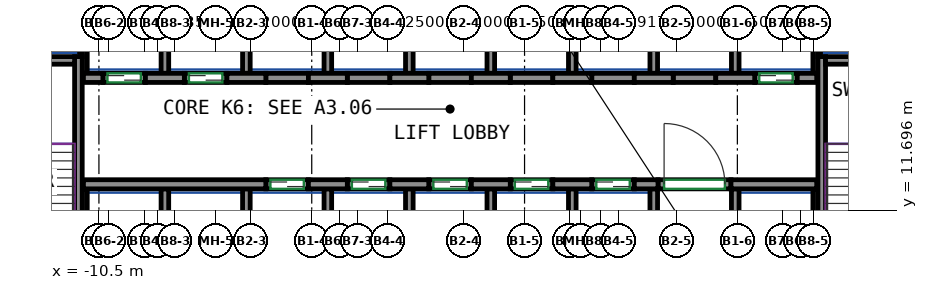
"""IFC4 building model, lengths in metres.
Left out: names, types, materials, properties, quantities, classifications, styles, units other than length and angle.
Written with IfcOpenShell. Run it as: python <this file> out.ifc"""

import sys

from ifc_helpers import new_model, si_unit, direction, frame, frame_2d, origin, place, context, subcontext, project, spatial, rectangle, extrude, source, transform, mapped, element, fill, save


model = new_model("IFC4")
c1 = context("Model", 3, precision=1e-05, world=origin(), true_north=direction((0.0, 1.0)))
c2 = subcontext(c1, "Body", "Model", "MODEL_VIEW")
j1 = project(units=[si_unit("LENGTHUNIT", "METRE"), si_unit("PLANEANGLEUNIT", "RADIAN")], contexts=[c1])
p1 = place(None, origin())
s1 = spatial("IfcSite", under=j1, at=p1, CompositionType="ELEMENT")
p2 = place(p1, origin())
s2 = spatial("IfcBuilding", under=s1, at=p2, CompositionType="ELEMENT")
p3 = place(p2, frame((0.0, 0.0, 27.0)))
s3 = spatial("IfcBuildingStorey", under=s2, at=p3, CompositionType="ELEMENT", Elevation=27.0)
m1 = source(origin(), c2, "Body", "SweptSolid", [
    extrude(rectangle(XDim=7.75, YDim=0.25, at=frame_2d((3.875, 0.0))), origin(), (0.0, 0.0, 1.0), 3.72),
])
p4 = place(p3, frame((-11.175, 9.0, 0.0), z_axis=(0.0, 0.0, 1.0), x_axis=(0.0, 1.0, 0.0)))
e1 = element("IfcWall", 1, at=p4, inside=s3, PredefinedType="SHEAR", context=c2, shape_type="MappedRepresentation", body=[
    mapped(m1, transform((0.0, 0.0, 0.0))),
])
m2 = source(origin(), c2, "Body", "SweptSolid", [
    extrude(rectangle(XDim=3.7, YDim=0.25, at=frame_2d((1.85, 0.0))), origin(), (0.0, 0.0, 1.0), 3.72),
])
p5 = place(p3, frame((-15.0, 16.625, 0.0), z_axis=(0.0, 0.0, 1.0), x_axis=(1.0, 0.0, 0.0)))
e2 = element("IfcWall", 2, at=p5, inside=s3, PredefinedType="SHEAR", context=c2, shape_type="MappedRepresentation", body=[
    mapped(m2, transform((0.0, 0.0, 0.0))),
])
p6 = place(p3, frame((13.275, 9.0, 0.0), z_axis=(0.0, 0.0, 1.0), x_axis=(0.0, 1.0, 0.0)))
e3 = element("IfcWall", 3, at=p6, inside=s3, PredefinedType="SHEAR", context=c2, shape_type="MappedRepresentation", body=[
    mapped(m1, transform((0.0, 0.0, 0.0))),
])
m3 = source(origin(), c2, "Body", "SweptSolid", [
    extrude(rectangle(XDim=3.7, YDim=0.25, at=frame_2d((1.85, 0.0))), origin(), (0.0, 0.0, 1.0), 3.72),
])
p7 = place(p3, frame((13.4, 16.625, 0.0), z_axis=(0.0, 0.0, 1.0), x_axis=(1.0, 0.0, 0.0)))
e4 = element("IfcWall", 4, at=p7, inside=s3, PredefinedType="SHEAR", context=c2, shape_type="MappedRepresentation", body=[
    mapped(m3, transform((0.0, 0.0, 0.0))),
])
m4 = source(origin(), c2, "Body", "SweptSolid", [
    extrude(rectangle(XDim=6.0, YDim=0.3, at=frame_2d((3.0, 0.0))), origin(), (0.0, 0.0, 1.0), 3.72),
])
p8 = place(p3, frame((-11.01, 12.55, 0.0), z_axis=(0.0, 0.0, 1.0), x_axis=(1.0, 0.0, 0.0)))
e5 = element("IfcWall", 5, at=p8, inside=s3, PredefinedType="SHEAR", context=c2, shape_type="MappedRepresentation", body=[
    mapped(m4, transform((0.0, 0.0, 0.0))),
])
m5 = source(origin(), c2, "Body", "SweptSolid", [
    extrude(rectangle(XDim=1.28, YDim=0.3, at=frame_2d((0.64, 0.0))), origin(), (0.0, 0.0, 1.0), 3.72),
])
for number, where, z_axis, x_axis in (
    (6, (-3.61, 12.55, 0.0), (0.0, 0.0, 1.0), (1.0, 0.0, 0.0)),
    (7, (-0.93, 12.55, 0.0), (0.0, 0.0, 1.0), (1.0, 0.0, 0.0)),
    (8, (1.75, 12.55, 0.0), (0.0, 0.0, 1.0), (1.0, 0.0, 0.0)),
    (9, (4.43, 12.55, 0.0), (0.0, 0.0, 1.0), (1.0, 0.0, 0.0)),
):
    element("IfcWall", number, at=place(p3, frame(where, z_axis=z_axis, x_axis=x_axis)), inside=s3, PredefinedType="SHEAR", context=c2, shape_type="MappedRepresentation", body=[
        mapped(m5, transform((0.0, 0.0, 0.0))),
    ])
m6 = source(origin(), c2, "Body", "SweptSolid", [
    extrude(rectangle(XDim=0.78, YDim=0.3, at=frame_2d((0.39, 0.0))), origin(), (0.0, 0.0, 1.0), 3.72),
])
p9 = place(p3, frame((7.11, 12.55, 0.0), z_axis=(0.0, 0.0, 1.0), x_axis=(1.0, 0.0, 0.0)))
e10 = element("IfcWall", 10, at=p9, inside=s3, PredefinedType="SHEAR", context=c2, shape_type="MappedRepresentation", body=[
    mapped(m6, transform((0.0, 0.0, 0.0))),
])
m7 = source(origin(), c2, "Body", "SweptSolid", [
    extrude(rectangle(XDim=2.82, YDim=0.3, at=frame_2d((1.41, 0.0))), origin(), (0.0, 0.0, 1.0), 3.72),
])
p10 = place(p3, frame((10.29, 12.55, 0.0), z_axis=(0.0, 0.0, 1.0), x_axis=(1.0, 0.0, 0.0)))
e11 = element("IfcWall", 11, at=p10, inside=s3, PredefinedType="SHEAR", context=c2, shape_type="MappedRepresentation", body=[
    mapped(m7, transform((0.0, 0.0, 0.0))),
])
m8 = source(origin(), c2, "Body", "SweptSolid", [
    extrude(rectangle(XDim=0.64, YDim=0.3, at=frame_2d((0.32, 0.0))), origin(), (0.0, 0.0, 1.0), 3.72),
])
p11 = place(p3, frame((-11.01, 16.05, 0.0), z_axis=(0.0, 0.0, 1.0), x_axis=(1.0, 0.0, 0.0)))
e12 = element("IfcWall", 12, at=p11, inside=s3, PredefinedType="SHEAR", context=c2, shape_type="MappedRepresentation", body=[
    mapped(m8, transform((0.0, 0.0, 0.0))),
])
for number, where, z_axis, x_axis in (
    (13, (-8.97, 16.05, 0.0), (0.0, 0.0, 1.0), (1.0, 0.0, 0.0)),
    (14, (-6.29, 16.05, 0.0), (0.0, 0.0, 1.0), (1.0, 0.0, 0.0)),
    (15, (-3.61, 16.05, 0.0), (0.0, 0.0, 1.0), (1.0, 0.0, 0.0)),
    (16, (-0.93, 16.05, 0.0), (0.0, 0.0, 1.0), (1.0, 0.0, 0.0)),
    (17, (1.75, 16.05, 0.0), (0.0, 0.0, 1.0), (1.0, 0.0, 0.0)),
    (18, (4.43, 16.05, 0.0), (0.0, 0.0, 1.0), (1.0, 0.0, 0.0)),
):
    element("IfcWall", number, at=place(p3, frame(where, z_axis=z_axis, x_axis=x_axis)), inside=s3, PredefinedType="SHEAR", context=c2, shape_type="MappedRepresentation", body=[
        mapped(m5, transform((0.0, 0.0, 0.0))),
    ])
m9 = source(origin(), c2, "Body", "SweptSolid", [
    extrude(rectangle(XDim=1.28, YDim=0.3, at=frame_2d((0.64, 0.0))), origin(), (0.0, 0.0, 1.0), 3.72),
])
p12 = place(p3, frame((7.11, 16.05, 0.0), z_axis=(0.0, 0.0, 1.0), x_axis=(1.0, 0.0, 0.0)))
e19 = element("IfcWall", 19, at=p12, inside=s3, PredefinedType="SHEAR", context=c2, shape_type="MappedRepresentation", body=[
    mapped(m9, transform((0.0, 0.0, 0.0))),
])
p13 = place(p3, frame((9.79, 16.05, 0.0), z_axis=(0.0, 0.0, 1.0), x_axis=(1.0, 0.0, 0.0)))
e20 = element("IfcWall", 20, at=p13, inside=s3, PredefinedType="SHEAR", context=c2, shape_type="MappedRepresentation", body=[
    mapped(m5, transform((0.0, 0.0, 0.0))),
])
m10 = source(origin(), c2, "Body", "SweptSolid", [
    extrude(rectangle(XDim=0.64, YDim=0.3, at=frame_2d((0.32, 0.0))), origin(), (0.0, 0.0, 1.0), 3.72),
])
p14 = place(p3, frame((12.47, 16.05, 0.0), z_axis=(0.0, 0.0, 1.0), x_axis=(1.0, 0.0, 0.0)))
e21 = element("IfcWall", 21, at=p14, inside=s3, PredefinedType="SHEAR", context=c2, shape_type="MappedRepresentation", body=[
    mapped(m10, transform((0.0, 0.0, 0.0))),
])
m11 = source(origin(), c2, "Body", "SweptSolid", [
    extrude(rectangle(XDim=1.4, YDim=0.3, at=frame_2d((0.7, 0.0))), origin(), (0.0, 0.0, 1.0), 3.72),
])
p15 = place(p3, frame((-5.01, 12.55, 0.0), z_axis=(0.0, 0.0, 1.0), x_axis=(1.0, 0.0, 0.0)))
e22 = element("IfcWall", 22, at=p15, inside=s3, PredefinedType="PARTITIONING", context=c2, shape_type="MappedRepresentation", body=[
    mapped(m11, transform((0.0, 0.0, 0.0))),
])
p16 = place(p15, frame((0.15, 0.0, 0.0)))
e23 = element("IfcOpeningElement", 23, at=p16, cuts=e22, PredefinedType="OPENING", context=c2, shape_type="SweptSolid", body=[
    extrude(rectangle(XDim=1.1, YDim=2.1, at=frame_2d((0.55, 1.05))), frame((0.0, 0.16, 0.0), z_axis=(0.0, -1.0, 0.0), x_axis=(1.0, 0.0, 0.0)), (0.0, 0.0, 1.0), 0.32),
])
m12 = source(origin(), c2, "Body", "SweptSolid", [
    extrude(rectangle(XDim=1.4, YDim=0.3, at=frame_2d((0.7, 0.0))), origin(), (0.0, 0.0, 1.0), 3.72),
])
p17 = place(p3, frame((-2.33, 12.55, 0.0), z_axis=(0.0, 0.0, 1.0), x_axis=(1.0, 0.0, 0.0)))
e24 = element("IfcWall", 24, at=p17, inside=s3, PredefinedType="PARTITIONING", context=c2, shape_type="MappedRepresentation", body=[
    mapped(m12, transform((0.0, 0.0, 0.0))),
])
p18 = place(p17, frame((0.15, 0.0, 0.0)))
e25 = element("IfcOpeningElement", 25, at=p18, cuts=e24, PredefinedType="OPENING", context=c2, shape_type="SweptSolid", body=[
    extrude(rectangle(XDim=1.1, YDim=2.1, at=frame_2d((0.55, 1.05))), frame((0.0, 0.16, 0.0), z_axis=(0.0, -1.0, 0.0), x_axis=(1.0, 0.0, 0.0)), (0.0, 0.0, 1.0), 0.32),
])
p19 = place(p3, frame((0.35, 12.55, 0.0), z_axis=(0.0, 0.0, 1.0), x_axis=(1.0, 0.0, 0.0)))
e26 = element("IfcWall", 26, at=p19, inside=s3, PredefinedType="PARTITIONING", context=c2, shape_type="MappedRepresentation", body=[
    mapped(m11, transform((0.0, 0.0, 0.0))),
])
p20 = place(p19, frame((0.15, 0.0, 0.0)))
e27 = element("IfcOpeningElement", 27, at=p20, cuts=e26, PredefinedType="OPENING", context=c2, shape_type="SweptSolid", body=[
    extrude(rectangle(XDim=1.1, YDim=2.1, at=frame_2d((0.55, 1.05))), frame((0.0, 0.16, 0.0), z_axis=(0.0, -1.0, 0.0), x_axis=(1.0, 0.0, 0.0)), (0.0, 0.0, 1.0), 0.32),
])
p21 = place(p3, frame((3.03, 12.55, 0.0), z_axis=(0.0, 0.0, 1.0), x_axis=(1.0, 0.0, 0.0)))
e28 = element("IfcWall", 28, at=p21, inside=s3, PredefinedType="PARTITIONING", context=c2, shape_type="MappedRepresentation", body=[
    mapped(m11, transform((0.0, 0.0, 0.0))),
])
p22 = place(p21, frame((0.15, 0.0, 0.0)))
e29 = element("IfcOpeningElement", 29, at=p22, cuts=e28, PredefinedType="OPENING", context=c2, shape_type="SweptSolid", body=[
    extrude(rectangle(XDim=1.1, YDim=2.1, at=frame_2d((0.55, 1.05))), frame((0.0, 0.16, 0.0), z_axis=(0.0, -1.0, 0.0), x_axis=(1.0, 0.0, 0.0)), (0.0, 0.0, 1.0), 0.32),
])
p23 = place(p3, frame((5.71, 12.55, 0.0), z_axis=(0.0, 0.0, 1.0), x_axis=(1.0, 0.0, 0.0)))
e30 = element("IfcWall", 30, at=p23, inside=s3, PredefinedType="PARTITIONING", context=c2, shape_type="MappedRepresentation", body=[
    mapped(m12, transform((0.0, 0.0, 0.0))),
])
p24 = place(p23, frame((0.15, 0.0, 0.0)))
e31 = element("IfcOpeningElement", 31, at=p24, cuts=e30, PredefinedType="OPENING", context=c2, shape_type="SweptSolid", body=[
    extrude(rectangle(XDim=1.1, YDim=2.1, at=frame_2d((0.55, 1.05))), frame((0.0, 0.16, 0.0), z_axis=(0.0, -1.0, 0.0), x_axis=(1.0, 0.0, 0.0)), (0.0, 0.0, 1.0), 0.32),
])
p25 = place(p3, frame((11.07, 16.05, 0.0), z_axis=(0.0, 0.0, 1.0), x_axis=(1.0, 0.0, 0.0)))
e32 = element("IfcWall", 32, at=p25, inside=s3, PredefinedType="PARTITIONING", context=c2, shape_type="MappedRepresentation", body=[
    mapped(m11, transform((0.0, 0.0, 0.0))),
])
p26 = place(p25, frame((0.15, 0.0, 0.0)))
e33 = element("IfcOpeningElement", 33, at=p26, cuts=e32, PredefinedType="OPENING", context=c2, shape_type="SweptSolid", body=[
    extrude(rectangle(XDim=1.1, YDim=2.1, at=frame_2d((0.55, 1.05))), frame((0.0, 0.16, 0.0), z_axis=(0.0, -1.0, 0.0), x_axis=(1.0, 0.0, 0.0)), (0.0, 0.0, 1.0), 0.32),
])
p27 = place(p3, frame((-10.37, 16.05, 0.0), z_axis=(0.0, 0.0, 1.0), x_axis=(1.0, 0.0, 0.0)))
e34 = element("IfcWall", 34, at=p27, inside=s3, PredefinedType="PARTITIONING", context=c2, shape_type="MappedRepresentation", body=[
    mapped(m12, transform((0.0, 0.0, 0.0))),
])
p28 = place(p27, frame((0.15, 0.0, 0.0)))
e35 = element("IfcOpeningElement", 35, at=p28, cuts=e34, PredefinedType="OPENING", context=c2, shape_type="SweptSolid", body=[
    extrude(rectangle(XDim=1.1, YDim=2.1, at=frame_2d((0.55, 1.05))), frame((0.0, 0.16, 0.0), z_axis=(0.0, -1.0, 0.0), x_axis=(1.0, 0.0, 0.0)), (0.0, 0.0, 1.0), 0.32),
])
p29 = place(p3, frame((-7.69, 16.05, 0.0), z_axis=(0.0, 0.0, 1.0), x_axis=(1.0, 0.0, 0.0)))
e36 = element("IfcWall", 36, at=p29, inside=s3, PredefinedType="PARTITIONING", context=c2, shape_type="MappedRepresentation", body=[
    mapped(m11, transform((0.0, 0.0, 0.0))),
])
p30 = place(p29, frame((0.15, 0.0, 0.0)))
e37 = element("IfcOpeningElement", 37, at=p30, cuts=e36, PredefinedType="OPENING", context=c2, shape_type="SweptSolid", body=[
    extrude(rectangle(XDim=1.1, YDim=2.1, at=frame_2d((0.55, 1.05))), frame((0.0, 0.16, 0.0), z_axis=(0.0, -1.0, 0.0), x_axis=(1.0, 0.0, 0.0)), (0.0, 0.0, 1.0), 0.32),
])
m13 = source(origin(), c2, "Body", "SweptSolid", [
    extrude(rectangle(XDim=2.4, YDim=0.3, at=frame_2d((1.2, 0.0))), origin(), (0.0, 0.0, 1.0), 3.72),
])
p31 = place(p3, frame((7.89, 12.55, 0.0), z_axis=(0.0, 0.0, 1.0), x_axis=(1.0, 0.0, 0.0)))
e38 = element("IfcWall", 38, at=p31, inside=s3, PredefinedType="PARTITIONING", context=c2, shape_type="MappedRepresentation", body=[
    mapped(m13, transform((0.0, 0.0, 0.0))),
])
p32 = place(p31, frame((0.2, 0.0, 0.0)))
e39 = element("IfcOpeningElement", 39, at=p32, cuts=e38, PredefinedType="OPENING", context=c2, shape_type="SweptSolid", body=[
    extrude(rectangle(XDim=2.0, YDim=2.1, at=frame_2d((1.0, 1.05))), frame((0.0, 0.16, 0.0), z_axis=(0.0, -1.0, 0.0), x_axis=(1.0, 0.0, 0.0)), (0.0, 0.0, 1.0), 0.32),
])
p33 = place(p3, frame((-5.01, 16.05, 0.0), z_axis=(0.0, 0.0, 1.0), x_axis=(1.0, 0.0, 0.0)))
e40 = element("IfcWall", 40, at=p33, inside=s3, PredefinedType="PARTITIONING", context=c2, shape_type="MappedRepresentation", body=[
    mapped(m11, transform((0.0, 0.0, 0.0))),
])
p34 = place(p3, frame((-2.33, 16.05, 0.0), z_axis=(0.0, 0.0, 1.0), x_axis=(1.0, 0.0, 0.0)))
e41 = element("IfcWall", 41, at=p34, inside=s3, PredefinedType="PARTITIONING", context=c2, shape_type="MappedRepresentation", body=[
    mapped(m12, transform((0.0, 0.0, 0.0))),
])
for number, where, z_axis, x_axis in (
    (42, (0.35, 16.05, 0.0), (0.0, 0.0, 1.0), (1.0, 0.0, 0.0)),
    (43, (3.03, 16.05, 0.0), (0.0, 0.0, 1.0), (1.0, 0.0, 0.0)),
):
    element("IfcWall", number, at=place(p3, frame(where, z_axis=z_axis, x_axis=x_axis)), inside=s3, PredefinedType="PARTITIONING", context=c2, shape_type="MappedRepresentation", body=[
        mapped(m11, transform((0.0, 0.0, 0.0))),
    ])
for number, where, z_axis, x_axis in (
    (44, (5.71, 16.05, 0.0), (0.0, 0.0, 1.0), (1.0, 0.0, 0.0)),
    (45, (8.39, 16.05, 0.0), (0.0, 0.0, 1.0), (1.0, 0.0, 0.0)),
):
    element("IfcWall", number, at=place(p3, frame(where, z_axis=z_axis, x_axis=x_axis)), inside=s3, PredefinedType="PARTITIONING", context=c2, shape_type="MappedRepresentation", body=[
        mapped(m12, transform((0.0, 0.0, 0.0))),
    ])
m14 = source(origin(), c2, "Body", "SweptSolid", [
    extrude(rectangle(XDim=3.275, YDim=0.165, at=frame_2d((1.638, 0.0))), origin(), (0.0, 0.0, 1.0), 3.72),
])
for number, where, z_axis, x_axis in (
    (46, (13.067, 16.2, 0.0), (0.0, 0.0, 1.0), (0.0, 1.0, 0.0)),
    (47, (-10.968, 16.2, 0.0), (0.0, 0.0, 1.0), (0.0, 1.0, 0.0)),
):
    element("IfcWall", number, at=place(p3, frame(where, z_axis=z_axis, x_axis=x_axis)), inside=s3, PredefinedType="PARTITIONING", context=c2, shape_type="MappedRepresentation", body=[
        mapped(m14, transform((0.0, 0.0, 0.0))),
    ])
m15 = source(origin(), c2, "Body", "SweptSolid", [
    extrude(rectangle(XDim=3.275, YDim=0.25, at=frame_2d((1.638, 0.0))), origin(), (0.0, 0.0, 1.0), 3.72),
])
p35 = place(p3, frame((10.43, 16.2, 0.0), z_axis=(0.0, 0.0, 1.0), x_axis=(0.0, 1.0, 0.0)))
e48 = element("IfcWall", 48, at=p35, inside=s3, PredefinedType="PARTITIONING", context=c2, shape_type="MappedRepresentation", body=[
    mapped(m15, transform((0.0, 0.0, 0.0))),
])
m16 = source(origin(), c2, "Body", "SweptSolid", [
    extrude(rectangle(XDim=2.725, YDim=0.085, at=frame_2d((1.363, 0.0))), origin(), (0.0, 0.0, 1.0), 3.72),
])
p36 = place(p3, frame((13.192, 16.75, 0.0), z_axis=(0.0, 0.0, 1.0), x_axis=(0.0, 1.0, 0.0)))
e49 = element("IfcWall", 49, at=p36, inside=s3, PredefinedType="PARTITIONING", context=c2, shape_type="MappedRepresentation", body=[
    mapped(m16, transform((0.0, 0.0, 0.0))),
])
for number, where, z_axis, x_axis in (
    (50, (2.39, 16.2, 0.0), (0.0, 0.0, 1.0), (0.0, 1.0, 0.0)),
    (51, (5.07, 16.2, 0.0), (0.0, 0.0, 1.0), (0.0, 1.0, 0.0)),
    (52, (7.75, 16.2, 0.0), (0.0, 0.0, 1.0), (0.0, 1.0, 0.0)),
    (53, (-0.29, 16.2, 0.0), (0.0, 0.0, 1.0), (0.0, 1.0, 0.0)),
):
    element("IfcWall", number, at=place(p3, frame(where, z_axis=z_axis, x_axis=x_axis)), inside=s3, PredefinedType="PARTITIONING", context=c2, shape_type="MappedRepresentation", body=[
        mapped(m15, transform((0.0, 0.0, 0.0))),
    ])
p37 = place(p3, frame((-11.093, 16.75, 0.0), z_axis=(0.0, 0.0, 1.0), x_axis=(0.0, 1.0, 0.0)))
e54 = element("IfcWall", 54, at=p37, inside=s3, PredefinedType="PARTITIONING", context=c2, shape_type="MappedRepresentation", body=[
    mapped(m16, transform((0.0, 0.0, 0.0))),
])
for number, where, z_axis, x_axis in (
    (55, (-2.97, 16.2, 0.0), (0.0, 0.0, 1.0), (0.0, 1.0, 0.0)),
    (56, (-5.65, 16.2, 0.0), (0.0, 0.0, 1.0), (0.0, 1.0, 0.0)),
    (57, (-8.33, 16.2, 0.0), (0.0, 0.0, 1.0), (0.0, 1.0, 0.0)),
):
    element("IfcWall", number, at=place(p3, frame(where, z_axis=z_axis, x_axis=x_axis)), inside=s3, PredefinedType="PARTITIONING", context=c2, shape_type="MappedRepresentation", body=[
        mapped(m15, transform((0.0, 0.0, 0.0))),
    ])
m17 = source(origin(), c2, "Body", "SweptSolid", [
    extrude(rectangle(XDim=3.4, YDim=0.25, at=frame_2d((1.7, 0.0))), origin(), (0.0, 0.0, 1.0), 3.72),
])
p38 = place(p3, frame((10.43, 9.0, 0.0), z_axis=(0.0, 0.0, 1.0), x_axis=(0.0, 1.0, 0.0)))
e58 = element("IfcWall", 58, at=p38, inside=s3, PredefinedType="PARTITIONING", context=c2, shape_type="MappedRepresentation", body=[
    mapped(m17, transform((0.0, 0.0, 0.0))),
])
m18 = source(origin(), c2, "Body", "SweptSolid", [
    extrude(rectangle(XDim=3.4, YDim=0.165, at=frame_2d((1.7, 0.0))), origin(), (0.0, 0.0, 1.0), 3.72),
])
p39 = place(p3, frame((13.067, 9.0, 0.0), z_axis=(0.0, 0.0, 1.0), x_axis=(0.0, 1.0, 0.0)))
e59 = element("IfcWall", 59, at=p39, inside=s3, PredefinedType="PARTITIONING", context=c2, shape_type="MappedRepresentation", body=[
    mapped(m18, transform((0.0, 0.0, 0.0))),
])
for number, where, z_axis, x_axis in (
    (60, (2.39, 9.0, 0.0), (0.0, 0.0, 1.0), (0.0, 1.0, 0.0)),
    (61, (5.07, 9.0, 0.0), (0.0, 0.0, 1.0), (0.0, 1.0, 0.0)),
    (62, (7.75, 9.0, 0.0), (0.0, 0.0, 1.0), (0.0, 1.0, 0.0)),
    (63, (-0.29, 9.0, 0.0), (0.0, 0.0, 1.0), (0.0, 1.0, 0.0)),
):
    element("IfcWall", number, at=place(p3, frame(where, z_axis=z_axis, x_axis=x_axis)), inside=s3, PredefinedType="PARTITIONING", context=c2, shape_type="MappedRepresentation", body=[
        mapped(m17, transform((0.0, 0.0, 0.0))),
    ])
p40 = place(p3, frame((-10.968, 9.0, 0.0), z_axis=(0.0, 0.0, 1.0), x_axis=(0.0, 1.0, 0.0)))
e64 = element("IfcWall", 64, at=p40, inside=s3, PredefinedType="PARTITIONING", context=c2, shape_type="MappedRepresentation", body=[
    mapped(m18, transform((0.0, 0.0, 0.0))),
])
for number, where, z_axis, x_axis in (
    (65, (-2.97, 9.0, 0.0), (0.0, 0.0, 1.0), (0.0, 1.0, 0.0)),
    (66, (-5.65, 9.0, 0.0), (0.0, 0.0, 1.0), (0.0, 1.0, 0.0)),
    (67, (-8.33, 9.0, 0.0), (0.0, 0.0, 1.0), (0.0, 1.0, 0.0)),
):
    element("IfcWall", number, at=place(p3, frame(where, z_axis=z_axis, x_axis=x_axis)), inside=s3, PredefinedType="PARTITIONING", context=c2, shape_type="MappedRepresentation", body=[
        mapped(m17, transform((0.0, 0.0, 0.0))),
    ])
p41 = place(p32, origin())
e68 = element("IfcDoor", 68, at=p41, inside=s3, OperationType="DOUBLE_DOOR_SINGLE_SWING", PredefinedType="DOOR", context=c2, shape_type="SweptSolid", body=[
    extrude(rectangle(XDim=2.0, YDim=2.1, at=frame_2d((1.0, 1.05))), frame((0.0, 0.025, 0.0), z_axis=(0.0, -1.0, 0.0), x_axis=(1.0, 0.0, 0.0)), (0.0, 0.0, 1.0), 0.05),
])
fill(e39, e68)
p42 = place(p16, origin())
e69 = element("IfcDoor", 69, at=p42, inside=s3, OperationType="DOUBLE_DOOR_SLIDING", PredefinedType="DOOR", context=c2, shape_type="SweptSolid", body=[
    extrude(rectangle(XDim=1.1, YDim=2.1, at=frame_2d((0.55, 1.05))), frame((0.0, 0.025, 0.0), z_axis=(0.0, -1.0, 0.0), x_axis=(1.0, 0.0, 0.0)), (0.0, 0.0, 1.0), 0.05),
])
fill(e23, e69)
p43 = place(p18, origin())
e70 = element("IfcDoor", 70, at=p43, inside=s3, OperationType="DOUBLE_DOOR_SLIDING", PredefinedType="DOOR", context=c2, shape_type="SweptSolid", body=[
    extrude(rectangle(XDim=1.1, YDim=2.1, at=frame_2d((0.55, 1.05))), frame((0.0, 0.025, 0.0), z_axis=(0.0, -1.0, 0.0), x_axis=(1.0, 0.0, 0.0)), (0.0, 0.0, 1.0), 0.05),
])
fill(e25, e70)
p44 = place(p20, origin())
e71 = element("IfcDoor", 71, at=p44, inside=s3, OperationType="DOUBLE_DOOR_SLIDING", PredefinedType="DOOR", context=c2, shape_type="SweptSolid", body=[
    extrude(rectangle(XDim=1.1, YDim=2.1, at=frame_2d((0.55, 1.05))), frame((0.0, 0.025, 0.0), z_axis=(0.0, -1.0, 0.0), x_axis=(1.0, 0.0, 0.0)), (0.0, 0.0, 1.0), 0.05),
])
fill(e27, e71)
p45 = place(p22, origin())
e72 = element("IfcDoor", 72, at=p45, inside=s3, OperationType="DOUBLE_DOOR_SLIDING", PredefinedType="DOOR", context=c2, shape_type="SweptSolid", body=[
    extrude(rectangle(XDim=1.1, YDim=2.1, at=frame_2d((0.55, 1.05))), frame((0.0, 0.025, 0.0), z_axis=(0.0, -1.0, 0.0), x_axis=(1.0, 0.0, 0.0)), (0.0, 0.0, 1.0), 0.05),
])
fill(e29, e72)
p46 = place(p24, origin())
e73 = element("IfcDoor", 73, at=p46, inside=s3, OperationType="DOUBLE_DOOR_SLIDING", PredefinedType="DOOR", context=c2, shape_type="SweptSolid", body=[
    extrude(rectangle(XDim=1.1, YDim=2.1, at=frame_2d((0.55, 1.05))), frame((0.0, 0.025, 0.0), z_axis=(0.0, -1.0, 0.0), x_axis=(1.0, 0.0, 0.0)), (0.0, 0.0, 1.0), 0.05),
])
fill(e31, e73)
p47 = place(p26, origin())
e74 = element("IfcDoor", 74, at=p47, inside=s3, OperationType="DOUBLE_DOOR_SLIDING", PredefinedType="DOOR", context=c2, shape_type="SweptSolid", body=[
    extrude(rectangle(XDim=1.1, YDim=2.1, at=frame_2d((0.55, 1.05))), frame((0.0, 0.025, 0.0), z_axis=(0.0, -1.0, 0.0), x_axis=(1.0, 0.0, 0.0)), (0.0, 0.0, 1.0), 0.05),
])
fill(e33, e74)
p48 = place(p28, origin())
e75 = element("IfcDoor", 75, at=p48, inside=s3, OperationType="DOUBLE_DOOR_SLIDING", PredefinedType="DOOR", context=c2, shape_type="SweptSolid", body=[
    extrude(rectangle(XDim=1.1, YDim=2.1, at=frame_2d((0.55, 1.05))), frame((0.0, 0.025, 0.0), z_axis=(0.0, -1.0, 0.0), x_axis=(1.0, 0.0, 0.0)), (0.0, 0.0, 1.0), 0.05),
])
fill(e35, e75)
p49 = place(p30, origin())
e76 = element("IfcDoor", 76, at=p49, inside=s3, OperationType="DOUBLE_DOOR_SLIDING", PredefinedType="DOOR", context=c2, shape_type="SweptSolid", body=[
    extrude(rectangle(XDim=1.1, YDim=2.1, at=frame_2d((0.55, 1.05))), frame((0.0, 0.025, 0.0), z_axis=(0.0, -1.0, 0.0), x_axis=(1.0, 0.0, 0.0)), (0.0, 0.0, 1.0), 0.05),
])
fill(e37, e76)
save(model, sys.argv[1])
